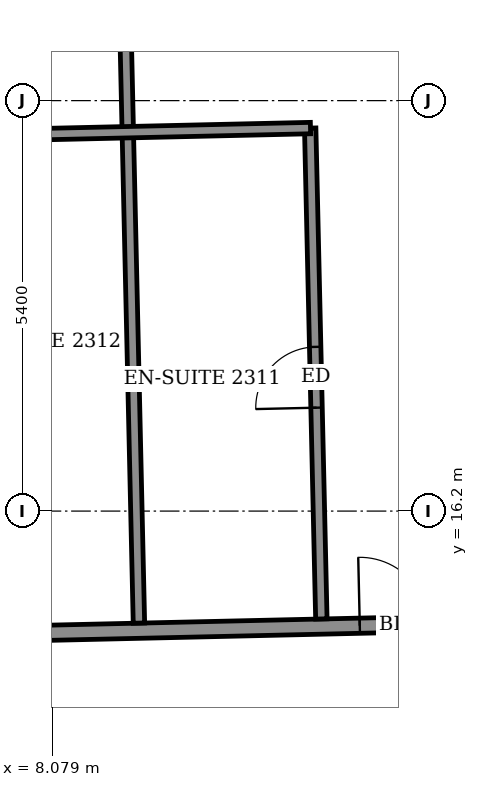
"""IFC4 building model, lengths in metres.
Left out: names, types, materials, properties, quantities, classifications, styles, units other than length and angle.
Written with IfcOpenShell. Run it as: python <this file> out.ifc"""

import sys

from ifc_helpers import new_model, si_unit, direction, frame, frame_2d, origin, place, context, subcontext, project, spatial, rectangle, extrude, element, fill, save


model = new_model("IFC4")
c1 = context("Model", 3, precision=1e-05, world=origin(), true_north=direction((0.0, 1.0)))
c2 = subcontext(c1, "Body", "Model", "MODEL_VIEW")
j1 = project(units=[si_unit("LENGTHUNIT", "METRE"), si_unit("PLANEANGLEUNIT", "RADIAN")], contexts=[c1])
p1 = place(None, origin())
s1 = spatial("IfcSite", under=j1, at=p1, CompositionType="ELEMENT")
p2 = place(p1, origin())
s2 = spatial("IfcBuilding", under=s1, at=p2, CompositionType="ELEMENT")
p3 = place(p2, frame((0.0, 0.0, 93.7)))
s3 = spatial("IfcBuildingStorey", under=s2, at=p3, CompositionType="ELEMENT", Elevation=93.7)
p4 = place(p3, frame((-24.92, 13.851, 0.0), z_axis=(0.0, 0.0, 1.0), x_axis=(0.999742411711, 0.022696039895, 0.0)))
e1 = element("IfcWall", 1, at=p4, inside=s3, PredefinedType="PARTITIONING", context=c2, shape_type="SweptSolid", body=[
    extrude(rectangle(XDim=52.472, YDim=0.2, at=frame_2d((26.236, 0.0))), origin(), (0.0, 0.0, 1.0), 3.05),
])
p5 = place(p4, frame((50.088, 0.0, 0.0)))
e2 = element("IfcOpeningElement", 2, at=p5, cuts=e1, PredefinedType="OPENING", context=c2, shape_type="SweptSolid", body=[
    extrude(rectangle(XDim=1.0, YDim=2.1, at=frame_2d((0.5, 1.05))), frame((0.0, 0.11, 0.0), z_axis=(0.0, -1.0, 0.0), x_axis=(1.0, 0.0, 0.0)), (0.0, 0.0, 1.0), 0.22),
])
p6 = place(p4, frame((45.725, 0.0, 0.0)))
e3 = element("IfcOpeningElement", 3, at=p6, cuts=e1, PredefinedType="OPENING", context=c2, shape_type="SweptSolid", body=[
    extrude(rectangle(XDim=0.9, YDim=2.1, at=frame_2d((0.45, 1.05))), frame((0.0, 0.11, 0.0), z_axis=(0.0, -1.0, 0.0), x_axis=(1.0, 0.0, 0.0)), (0.0, 0.0, 1.0), 0.22),
])
p7 = place(p4, frame((38.975, 0.0, 0.0)))
e4 = element("IfcOpeningElement", 4, at=p7, cuts=e1, PredefinedType="OPENING", context=c2, shape_type="SweptSolid", body=[
    extrude(rectangle(XDim=0.9, YDim=2.1, at=frame_2d((0.45, 1.05))), frame((0.0, 0.11, 0.0), z_axis=(0.0, -1.0, 0.0), x_axis=(1.0, 0.0, 0.0)), (0.0, 0.0, 1.0), 0.22),
])
p8 = place(p4, frame((37.05, 0.0, 0.0)))
e5 = element("IfcOpeningElement", 5, at=p8, cuts=e1, PredefinedType="OPENING", context=c2, shape_type="SweptSolid", body=[
    extrude(rectangle(XDim=0.9, YDim=2.1, at=frame_2d((0.45, 1.05))), frame((0.0, 0.11, 0.0), z_axis=(0.0, -1.0, 0.0), x_axis=(1.0, 0.0, 0.0)), (0.0, 0.0, 1.0), 0.22),
])
p9 = place(p4, frame((30.35, 0.0, 0.0)))
e6 = element("IfcOpeningElement", 6, at=p9, cuts=e1, PredefinedType="OPENING", context=c2, shape_type="SweptSolid", body=[
    extrude(rectangle(XDim=0.9, YDim=2.1, at=frame_2d((0.45, 1.05))), frame((0.0, 0.11, 0.0), z_axis=(0.0, -1.0, 0.0), x_axis=(1.0, 0.0, 0.0)), (0.0, 0.0, 1.0), 0.22),
])
p10 = place(p4, frame((28.4, 0.0, 0.0)))
e7 = element("IfcOpeningElement", 7, at=p10, cuts=e1, PredefinedType="OPENING", context=c2, shape_type="SweptSolid", body=[
    extrude(rectangle(XDim=0.9, YDim=2.1, at=frame_2d((0.45, 1.05))), frame((0.0, 0.11, 0.0), z_axis=(0.0, -1.0, 0.0), x_axis=(1.0, 0.0, 0.0)), (0.0, 0.0, 1.0), 0.22),
])
p11 = place(p4, frame((21.675, 0.0, 0.0)))
e8 = element("IfcOpeningElement", 8, at=p11, cuts=e1, PredefinedType="OPENING", context=c2, shape_type="SweptSolid", body=[
    extrude(rectangle(XDim=0.9, YDim=2.1, at=frame_2d((0.45, 1.05))), frame((0.0, 0.11, 0.0), z_axis=(0.0, -1.0, 0.0), x_axis=(1.0, 0.0, 0.0)), (0.0, 0.0, 1.0), 0.22),
])
p12 = place(p4, frame((19.775, 0.0, 0.0)))
e9 = element("IfcOpeningElement", 9, at=p12, cuts=e1, PredefinedType="OPENING", context=c2, shape_type="SweptSolid", body=[
    extrude(rectangle(XDim=0.9, YDim=2.1, at=frame_2d((0.45, 1.05))), frame((0.0, 0.11, 0.0), z_axis=(0.0, -1.0, 0.0), x_axis=(1.0, 0.0, 0.0)), (0.0, 0.0, 1.0), 0.22),
])
p13 = place(p4, frame((13.0, 0.0, 0.0)))
e10 = element("IfcOpeningElement", 10, at=p13, cuts=e1, PredefinedType="OPENING", context=c2, shape_type="SweptSolid", body=[
    extrude(rectangle(XDim=0.9, YDim=2.1, at=frame_2d((0.45, 1.05))), frame((0.0, 0.11, 0.0), z_axis=(0.0, -1.0, 0.0), x_axis=(1.0, 0.0, 0.0)), (0.0, 0.0, 1.0), 0.22),
])
p14 = place(p4, frame((11.075, 0.0, 0.0)))
e11 = element("IfcOpeningElement", 11, at=p14, cuts=e1, PredefinedType="OPENING", context=c2, shape_type="SweptSolid", body=[
    extrude(rectangle(XDim=0.9, YDim=2.1, at=frame_2d((0.45, 1.05))), frame((0.0, 0.11, 0.0), z_axis=(0.0, -1.0, 0.0), x_axis=(1.0, 0.0, 0.0)), (0.0, 0.0, 1.0), 0.22),
])
p15 = place(p4, frame((3.049, 0.0, 0.0)))
e12 = element("IfcOpeningElement", 12, at=p15, cuts=e1, PredefinedType="OPENING", context=c2, shape_type="SweptSolid", body=[
    extrude(rectangle(XDim=1.0, YDim=2.1, at=frame_2d((0.5, 1.05))), frame((0.0, 0.11, 0.0), z_axis=(0.0, -1.0, 0.0), x_axis=(1.0, 0.0, 0.0)), (0.0, 0.0, 1.0), 0.22),
])
p16 = place(p3, frame((9.215, 14.726, 0.0), z_axis=(0.0, 0.0, 1.0), x_axis=(-0.022661475803, 0.999743195783, 0.0)))
e13 = element("IfcWall", 13, at=p16, inside=s3, PredefinedType="PARTITIONING", context=c2, shape_type="SweptSolid", body=[
    extrude(rectangle(XDim=12.4, YDim=0.15, at=frame_2d((6.2, 0.0))), origin(), (0.0, 0.0, 1.0), 2.55),
])
p17 = place(p3, frame((11.615, 14.781, 0.0), z_axis=(0.0, 0.0, 1.0), x_axis=(-0.022752312182, 0.999741132639, 0.0)))
e14 = element("IfcWall", 14, at=p17, inside=s3, PredefinedType="PARTITIONING", context=c2, shape_type="SweptSolid", body=[
    extrude(rectangle(XDim=6.46, YDim=0.15, at=frame_2d((3.23, 0.0))), origin(), (0.0, 0.0, 1.0), 3.05),
])
p18 = place(p17, frame((2.78, 0.0, 0.0)))
e15 = element("IfcOpeningElement", 15, at=p18, cuts=e14, PredefinedType="OPENING", context=c2, shape_type="SweptSolid", body=[
    extrude(rectangle(XDim=0.8, YDim=2.1, at=frame_2d((0.4, 1.05))), frame((0.0, 0.085, 0.0), z_axis=(0.0, -1.0, 0.0), x_axis=(1.0, 0.0, 0.0)), (0.0, 0.0, 1.0), 0.17),
])
p19 = place(p3, frame((6.673, 21.13, 0.0), z_axis=(0.0, 0.0, 1.0), x_axis=(0.999741520352, 0.022735269617, 0.0)))
e16 = element("IfcWall", 16, at=p19, inside=s3, PredefinedType="PARTITIONING", context=c2, shape_type="SweptSolid", body=[
    extrude(rectangle(XDim=4.8, YDim=0.15, at=frame_2d((2.4, 0.0))), origin(), (0.0, 0.0, 1.0), 3.05),
])
p20 = place(p8, origin())
e17 = element("IfcDoor", 17, at=p20, inside=s3, OperationType="SINGLE_SWING_LEFT", PredefinedType="DOOR", context=c2, shape_type="SweptSolid", body=[
    extrude(rectangle(XDim=0.9, YDim=2.1, at=frame_2d((0.45, 1.05))), frame((0.0, 0.025, 0.0), z_axis=(0.0, -1.0, 0.0), x_axis=(1.0, 0.0, 0.0)), (0.0, 0.0, 1.0), 0.05),
])
fill(e5, e17)
p21 = place(p18, origin())
e18 = element("IfcDoor", 18, at=p21, inside=s3, OperationType="SINGLE_SWING_LEFT", PredefinedType="DOOR", context=c2, shape_type="SweptSolid", body=[
    extrude(rectangle(XDim=0.8, YDim=2.1, at=frame_2d((0.4, 1.05))), frame((0.0, 0.025, 0.0), z_axis=(0.0, -1.0, 0.0), x_axis=(1.0, 0.0, 0.0)), (0.0, 0.0, 1.0), 0.05),
])
fill(e15, e18)
save(model, sys.argv[1])
